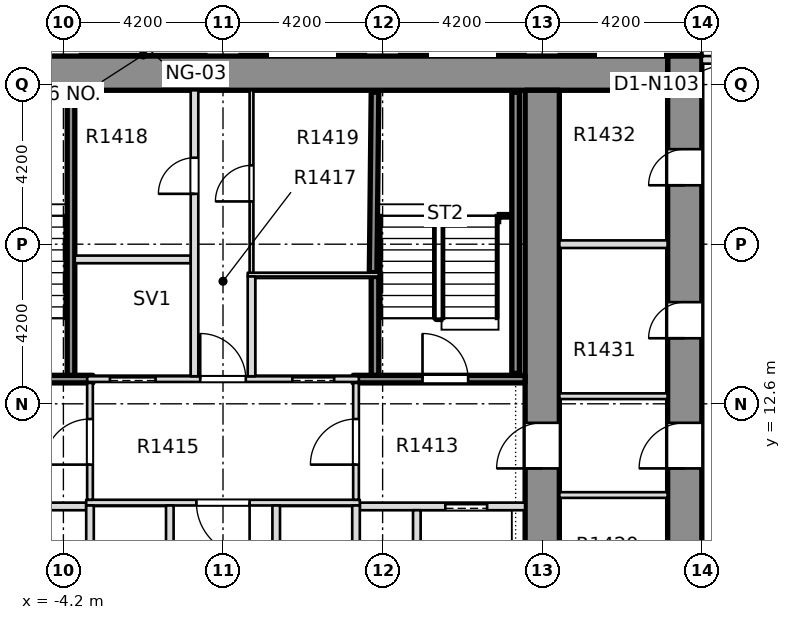
"""IFC4 building model, lengths in metres.
Left out: names, types, materials, properties, quantities, classifications, styles, units other than length and angle.
Written with IfcOpenShell. Run it as: python <this file> out.ifc"""

import sys

from ifc_helpers import new_model, si_unit, direction, frame, frame_2d, origin, place, context, subcontext, project, spatial, rectangle, extrude, element, fill, save


model = new_model("IFC4")
c1 = context("Model", 3, precision=1e-05, world=origin(), true_north=direction((0.0, 1.0)))
c2 = subcontext(c1, "Body", "Model", "MODEL_VIEW")
j1 = project(units=[si_unit("LENGTHUNIT", "METRE"), si_unit("PLANEANGLEUNIT", "RADIAN")], contexts=[c1])
p1 = place(None, origin())
s1 = spatial("IfcSite", under=j1, at=p1, CompositionType="ELEMENT")
p2 = place(p1, origin())
s2 = spatial("IfcBuilding", under=s1, at=p2, CompositionType="ELEMENT")
p3 = place(p2, frame((0.0, 0.0, 62.1)))
s3 = spatial("IfcBuildingStorey", under=s2, at=p3, CompositionType="ELEMENT", Elevation=62.1)
p4 = place(p3, frame((12.15, -8.4, -0.32), z_axis=(0.0, 0.0, 1.0), x_axis=(0.0, 1.0, 0.0)))
e1 = element("IfcWall", 1, at=p4, inside=s3, PredefinedType="SHEAR", context=c2, shape_type="SweptSolid", body=[
    extrude(rectangle(XDim=30.15, YDim=0.9, at=frame_2d((15.075, 0.0))), origin(), (0.0, 0.0, 1.0), 3.45),
])
p5 = place(p4, frame((3.425, 0.0, 0.32)))
e2 = element("IfcOpeningElement", 2, at=p5, cuts=e1, PredefinedType="OPENING", context=c2, shape_type="SweptSolid", body=[
    extrude(rectangle(XDim=0.95, YDim=2.1, at=frame_2d((0.475, 1.05))), frame((0.0, 0.46, 0.0), z_axis=(0.0, -1.0, 0.0), x_axis=(1.0, 0.0, 0.0)), (0.0, 0.0, 1.0), 0.92),
])
p6 = place(p4, frame((8.075, 0.0, 0.32)))
e3 = element("IfcOpeningElement", 3, at=p6, cuts=e1, PredefinedType="OPENING", context=c2, shape_type="SweptSolid", body=[
    extrude(rectangle(XDim=0.95, YDim=2.1, at=frame_2d((0.475, 1.05))), frame((0.0, 0.46, 0.0), z_axis=(0.0, -1.0, 0.0), x_axis=(1.0, 0.0, 0.0)), (0.0, 0.0, 1.0), 0.92),
])
p7 = place(p4, frame((11.425, 0.0, 0.32)))
e4 = element("IfcOpeningElement", 4, at=p7, cuts=e1, PredefinedType="OPENING", context=c2, shape_type="SweptSolid", body=[
    extrude(rectangle(XDim=0.95, YDim=2.1, at=frame_2d((0.475, 1.05))), frame((0.0, 0.46, 0.0), z_axis=(0.0, -1.0, 0.0), x_axis=(1.0, 0.0, 0.0)), (0.0, 0.0, 1.0), 0.92),
])
p8 = place(p4, frame((15.625, 0.0, 0.32)))
e5 = element("IfcOpeningElement", 5, at=p8, cuts=e1, PredefinedType="OPENING", context=c2, shape_type="SweptSolid", body=[
    extrude(rectangle(XDim=0.95, YDim=2.1, at=frame_2d((0.475, 1.05))), frame((0.0, 0.46, 0.0), z_axis=(0.0, -1.0, 0.0), x_axis=(1.0, 0.0, 0.0)), (0.0, 0.0, 1.0), 0.92),
])
p9 = place(p4, frame((22.725, 0.0, 0.32)))
e6 = element("IfcOpeningElement", 6, at=p9, cuts=e1, PredefinedType="OPENING", context=c2, shape_type="SweptSolid", body=[
    extrude(rectangle(XDim=0.95, YDim=2.1, at=frame_2d((0.475, 1.05))), frame((0.0, 0.46, 0.0), z_axis=(0.0, -1.0, 0.0), x_axis=(1.0, 0.0, 0.0)), (0.0, 0.0, 1.0), 0.92),
])
p10 = place(p4, frame((26.75, 0.0, 0.32)))
e7 = element("IfcOpeningElement", 7, at=p10, cuts=e1, PredefinedType="OPENING", context=c2, shape_type="SweptSolid", body=[
    extrude(rectangle(XDim=0.95, YDim=2.1, at=frame_2d((0.475, 1.05))), frame((0.0, 0.46, 0.0), z_axis=(0.0, -1.0, 0.0), x_axis=(1.0, 0.0, 0.0)), (0.0, 0.0, 1.0), 0.92),
])
p11 = place(p4, frame((19.3, 0.0, 0.32)))
e8 = element("IfcOpeningElement", 8, at=p11, cuts=e1, PredefinedType="OPENING", context=c2, shape_type="SweptSolid", body=[
    extrude(rectangle(XDim=1.2, YDim=2.1, at=frame_2d((0.6, 1.05))), frame((0.0, 0.46, 0.0), z_axis=(0.0, -1.0, 0.0), x_axis=(1.0, 0.0, 0.0)), (0.0, 0.0, 1.0), 0.92),
])
p12 = place(p3, frame((-11.7, 21.3, -0.32), z_axis=(0.0, 0.0, 1.0), x_axis=(1.0, 0.0, 0.0)))
e9 = element("IfcWall", 9, at=p12, inside=s3, PredefinedType="SOLIDWALL", context=c2, shape_type="SweptSolid", body=[
    extrude(rectangle(XDim=23.4, YDim=0.9, at=frame_2d((11.7, 0.0))), origin(), (0.0, 0.0, 1.0), 3.45),
])
p13 = place(p3, frame((8.4, -7.5, -0.32), z_axis=(0.0, 0.0, 1.0), x_axis=(0.0, 1.0, 0.0)))
e10 = element("IfcWall", 10, at=p13, inside=s3, PredefinedType="SHEAR", context=c2, shape_type="SweptSolid", body=[
    extrude(rectangle(XDim=28.35, YDim=0.9, at=frame_2d((14.175, 0.0))), origin(), (0.0, 0.0, 1.0), 3.45),
])
p14 = place(p13, frame((18.4, 0.0, 0.32)))
e11 = element("IfcOpeningElement", 11, at=p14, cuts=e10, PredefinedType="OPENING", context=c2, shape_type="SweptSolid", body=[
    extrude(rectangle(XDim=1.2, YDim=2.1, at=frame_2d((0.6, 1.05))), frame((0.0, 0.46, 0.0), z_axis=(0.0, -1.0, 0.0), x_axis=(1.0, 0.0, 0.0)), (0.0, 0.0, 1.0), 0.92),
])
p15 = place(p3, frame((16.1, 21.65, 0.0), z_axis=(0.0, 0.0, 1.0), x_axis=(-1.0, 0.0, 0.0)))
e12 = element("IfcWall", 12, at=p15, inside=s3, PredefinedType="STANDARD", context=c2, shape_type="SweptSolid", body=[
    extrude(rectangle(XDim=3.5, YDim=0.2, at=frame_2d((1.75, 0.0))), origin(), (0.0, 0.0, 1.0), 3.13),
])
p16 = place(p15, frame((2.2, 0.0, 0.0)))
e13 = element("IfcOpeningElement", 13, at=p16, cuts=e12, PredefinedType="OPENING", context=c2, shape_type="SweptSolid", body=[
    extrude(rectangle(XDim=1.0, YDim=2.4, at=frame_2d((0.5, 1.2))), frame((0.0, 0.11, 0.0), z_axis=(0.0, -1.0, 0.0), x_axis=(1.0, 0.0, 0.0)), (0.0, 0.0, 1.0), 0.22),
])
p17 = place(p3, frame((-7.949, 9.9, 0.0), z_axis=(0.0, 0.0, 1.0), x_axis=(1.0, 0.0, 0.0)))
e14 = element("IfcWall", 14, at=p17, inside=s3, PredefinedType="PARTITIONING", context=c2, shape_type="SweptSolid", body=[
    extrude(rectangle(XDim=4.349, YDim=0.2, at=frame_2d((2.174, 0.0))), origin(), (0.0, 0.0, 1.0), 3.13),
])
p18 = place(p17, frame((0.999, 0.0, 0.0)))
e15 = element("IfcOpeningElement", 15, at=p18, cuts=e14, PredefinedType="OPENING", context=c2, shape_type="SweptSolid", body=[
    extrude(rectangle(XDim=1.1, YDim=2.1, at=frame_2d((0.55, 1.05))), frame((0.0, 0.11, 0.0), z_axis=(0.0, -1.0, 0.0), x_axis=(1.0, 0.0, 0.0)), (0.0, 0.0, 1.0), 0.22),
])
p19 = place(p3, frame((3.6, 9.9, 0.0), z_axis=(0.0, 0.0, 1.0), x_axis=(1.0, 0.0, 0.0)))
e16 = element("IfcWall", 16, at=p19, inside=s3, PredefinedType="PARTITIONING", context=c2, shape_type="SweptSolid", body=[
    extrude(rectangle(XDim=4.349, YDim=0.2, at=frame_2d((2.174, 0.0))), origin(), (0.0, 0.0, 1.0), 3.13),
])
p20 = place(p19, frame((2.25, 0.0, 0.0)))
e17 = element("IfcOpeningElement", 17, at=p20, cuts=e16, PredefinedType="OPENING", context=c2, shape_type="SweptSolid", body=[
    extrude(rectangle(XDim=1.1, YDim=2.1, at=frame_2d((0.55, 1.05))), frame((0.0, 0.11, 0.0), z_axis=(0.0, -1.0, 0.0), x_axis=(1.0, 0.0, 0.0)), (0.0, 0.0, 1.0), 0.22),
])
p21 = place(p3, frame((-3.6, 10.0, 0.0), z_axis=(0.0, 0.0, 1.0), x_axis=(1.0, 0.0, 0.0)))
e18 = element("IfcWall", 18, at=p21, inside=s3, PredefinedType="PARTITIONING", context=c2, shape_type="SweptSolid", body=[
    extrude(rectangle(XDim=7.2, YDim=0.15, at=frame_2d((3.6, 0.0))), origin(), (0.0, 0.0, 1.0), 3.13),
])
p22 = place(p21, frame((2.9, 0.0, 0.0)))
e19 = element("IfcOpeningElement", 19, at=p22, cuts=e18, PredefinedType="OPENING", context=c2, shape_type="SweptSolid", body=[
    extrude(rectangle(XDim=1.4, YDim=2.1, at=frame_2d((0.7, 1.05))), frame((0.0, 0.085, 0.0), z_axis=(0.0, -1.0, 0.0), x_axis=(1.0, 0.0, 0.0)), (0.0, 0.0, 1.0), 0.17),
])
p23 = place(p3, frame((-7.949, 13.25, 0.0), z_axis=(0.0, 0.0, 1.0), x_axis=(1.0, 0.0, 0.0)))
e20 = element("IfcWall", 20, at=p23, inside=s3, PredefinedType="SOLIDWALL", context=c2, shape_type="SweptSolid", body=[
    extrude(rectangle(XDim=4.524, YDim=0.2, at=frame_2d((2.262, 0.0))), origin(), (0.0, 0.0, 1.0), 3.13),
])
p24 = place(p23, frame((1.499, 0.0, 0.0)))
e21 = element("IfcOpeningElement", 21, at=p24, cuts=e20, PredefinedType="OPENING", context=c2, shape_type="SweptSolid", body=[
    extrude(rectangle(XDim=1.2, YDim=2.1, at=frame_2d((0.6, 1.05))), frame((0.0, 0.11, 0.0), z_axis=(0.0, -1.0, 0.0), x_axis=(1.0, 0.0, 0.0)), (0.0, 0.0, 1.0), 0.22),
])
p25 = place(p3, frame((-3.575, 13.25, 0.0), z_axis=(0.0, 0.0, 1.0), x_axis=(1.0, 0.0, 0.0)))
e22 = element("IfcWall", 22, at=p25, inside=s3, PredefinedType="PARTITIONING", context=c2, shape_type="SweptSolid", body=[
    extrude(rectangle(XDim=7.15, YDim=0.15, at=frame_2d((3.575, 0.0))), origin(), (0.0, 0.0, 1.0), 3.13),
])
p26 = place(p25, frame((0.6, 0.0, 0.0)))
e23 = element("IfcOpeningElement", 23, at=p26, cuts=e22, PredefinedType="OPENING", context=c2, shape_type="SweptSolid", body=[
    extrude(rectangle(XDim=1.2, YDim=2.1, at=frame_2d((0.6, 1.05))), frame((0.0, 0.085, 0.0), z_axis=(0.0, -1.0, 0.0), x_axis=(1.0, 0.0, 0.0)), (0.0, 0.0, 1.0), 0.17),
])
p27 = place(p25, frame((5.4, 0.0, 0.0)))
e24 = element("IfcOpeningElement", 24, at=p27, cuts=e22, PredefinedType="OPENING", context=c2, shape_type="SweptSolid", body=[
    extrude(rectangle(XDim=1.1, YDim=2.1, at=frame_2d((0.55, 1.05))), frame((0.0, 0.085, 0.0), z_axis=(0.0, -1.0, 0.0), x_axis=(1.0, 0.0, 0.0)), (0.0, 0.0, 1.0), 0.17),
])
p28 = place(p25, frame((2.975, 0.0, 0.0)))
e25 = element("IfcOpeningElement", 25, at=p28, cuts=e22, PredefinedType="OPENING", context=c2, shape_type="SweptSolid", body=[
    extrude(rectangle(XDim=1.2, YDim=2.1, at=frame_2d((0.6, 1.05))), frame((0.0, 0.085, 0.0), z_axis=(0.0, -1.0, 0.0), x_axis=(1.0, 0.0, 0.0)), (0.0, 0.0, 1.0), 0.17),
])
p29 = place(p3, frame((3.425, 13.25, 0.0), z_axis=(0.0, 0.0, 1.0), x_axis=(1.0, 0.0, 0.0)))
e26 = element("IfcWall", 26, at=p29, inside=s3, PredefinedType="SOLIDWALL", context=c2, shape_type="SweptSolid", body=[
    extrude(rectangle(XDim=4.524, YDim=0.2, at=frame_2d((2.262, 0.0))), origin(), (0.0, 0.0, 1.0), 3.13),
])
p30 = place(p29, frame((1.825, 0.0, 0.0)))
e27 = element("IfcOpeningElement", 27, at=p30, cuts=e26, PredefinedType="OPENING", context=c2, shape_type="SweptSolid", body=[
    extrude(rectangle(XDim=1.2, YDim=2.1, at=frame_2d((0.6, 1.05))), frame((0.0, 0.11, 0.0), z_axis=(0.0, -1.0, 0.0), x_axis=(1.0, 0.0, 0.0)), (0.0, 0.0, 1.0), 0.22),
])
p31 = place(p3, frame((0.65, 16.0, 0.0), z_axis=(0.0, 0.0, 1.0), x_axis=(1.0, 0.0, 0.0)))
e28 = element("IfcWall", 28, at=p31, inside=s3, PredefinedType="PARTITIONING", context=c2, shape_type="SweptSolid", body=[
    extrude(rectangle(XDim=3.45, YDim=0.1, at=frame_2d((1.725, 0.0))), origin(), (0.0, 0.0, 1.0), 3.13),
])
p32 = place(p3, frame((-3.9, 16.4, 0.0), z_axis=(0.0, 0.0, 1.0), x_axis=(1.0, 0.0, 0.0)))
e29 = element("IfcWall", 29, at=p32, inside=s3, PredefinedType="PARTITIONING", context=c2, shape_type="SweptSolid", body=[
    extrude(rectangle(XDim=3.05, YDim=0.2, at=frame_2d((1.525, 0.0))), origin(), (0.0, 0.0, 1.0), 3.13),
])
p33 = place(p3, frame((-4.0, 13.35, 0.0), z_axis=(0.0, 0.0, 1.0), x_axis=(0.0, 1.0, 0.0)))
e30 = element("IfcWall", 30, at=p33, inside=s3, PredefinedType="SOLIDWALL", context=c2, shape_type="SweptSolid", body=[
    extrude(rectangle(XDim=7.499, YDim=0.2, at=frame_2d((3.75, 0.0))), origin(), (0.0, 0.0, 1.0), 3.13),
])
p34 = place(p3, frame((-3.5, 7.075, 0.0), z_axis=(0.0, 0.0, 1.0), x_axis=(0.0, 1.0, 0.0)))
e31 = element("IfcWall", 31, at=p34, inside=s3, PredefinedType="PARTITIONING", context=c2, shape_type="SweptSolid", body=[
    extrude(rectangle(XDim=2.85, YDim=0.2, at=frame_2d((1.425, 0.0))), origin(), (0.0, 0.0, 1.0), 3.13),
])
p35 = place(p3, frame((-3.5, 10.075, 0.0), z_axis=(0.0, 0.0, 1.0), x_axis=(0.0, 1.0, 0.0)))
e32 = element("IfcWall", 32, at=p35, inside=s3, PredefinedType="PARTITIONING", context=c2, shape_type="SweptSolid", body=[
    extrude(rectangle(XDim=3.075, YDim=0.15, at=frame_2d((1.538, 0.0))), origin(), (0.0, 0.0, 1.0), 3.13),
])
p36 = place(p35, frame((0.925, 0.0, 0.0)))
e33 = element("IfcOpeningElement", 33, at=p36, cuts=e32, PredefinedType="OPENING", context=c2, shape_type="SweptSolid", body=[
    extrude(rectangle(XDim=1.2, YDim=2.1, at=frame_2d((0.6, 1.05))), frame((0.0, 0.085, 0.0), z_axis=(0.0, -1.0, 0.0), x_axis=(1.0, 0.0, 0.0)), (0.0, 0.0, 1.0), 0.17),
])
p37 = place(p3, frame((-1.4, 7.075, 0.0), z_axis=(0.0, 0.0, 1.0), x_axis=(0.0, 1.0, 0.0)))
e34 = element("IfcWall", 34, at=p37, inside=s3, PredefinedType="PARTITIONING", context=c2, shape_type="SweptSolid", body=[
    extrude(rectangle(XDim=2.85, YDim=0.2, at=frame_2d((1.425, 0.0))), origin(), (0.0, 0.0, 1.0), 3.13),
])
p38 = place(p3, frame((-0.75, 13.325, 0.0), z_axis=(0.0, 0.0, 1.0), x_axis=(0.0, 1.0, 0.0)))
e35 = element("IfcWall", 35, at=p38, inside=s3, PredefinedType="PARTITIONING", context=c2, shape_type="SweptSolid", body=[
    extrude(rectangle(XDim=7.524, YDim=0.2, at=frame_2d((3.762, 0.0))), origin(), (0.0, 0.0, 1.0), 3.13),
])
p39 = place(p38, frame((4.8, 0.0, 0.0)))
e36 = element("IfcOpeningElement", 36, at=p39, cuts=e35, PredefinedType="OPENING", context=c2, shape_type="SweptSolid", body=[
    extrude(rectangle(XDim=0.95, YDim=2.1, at=frame_2d((0.475, 1.05))), frame((0.0, 0.11, 0.0), z_axis=(0.0, -1.0, 0.0), x_axis=(1.0, 0.0, 0.0)), (0.0, 0.0, 1.0), 0.22),
])
p40 = place(p3, frame((0.75, 13.325, 0.0), z_axis=(0.0, 0.0, 1.0), x_axis=(0.0, 1.0, 0.0)))
e37 = element("IfcWall", 37, at=p40, inside=s3, PredefinedType="PARTITIONING", context=c2, shape_type="SweptSolid", body=[
    extrude(rectangle(XDim=2.625, YDim=0.2, at=frame_2d((1.312, 0.0))), origin(), (0.0, 0.0, 1.0), 3.13),
])
p41 = place(p3, frame((0.75, 16.05, 0.0), z_axis=(0.0, 0.0, 1.0), x_axis=(0.0, 1.0, 0.0)))
e38 = element("IfcWall", 38, at=p41, inside=s3, PredefinedType="PARTITIONING", context=c2, shape_type="SweptSolid", body=[
    extrude(rectangle(XDim=4.799, YDim=0.1, at=frame_2d((2.399, 0.0))), origin(), (0.0, 0.0, 1.0), 3.13),
])
p42 = place(p41, frame((1.875, 0.0, 0.0)))
e39 = element("IfcOpeningElement", 39, at=p42, cuts=e38, PredefinedType="OPENING", context=c2, shape_type="SweptSolid", body=[
    extrude(rectangle(XDim=0.95, YDim=2.1, at=frame_2d((0.475, 1.05))), frame((0.0, 0.06, 0.0), z_axis=(0.0, -1.0, 0.0), x_axis=(1.0, 0.0, 0.0)), (0.0, 0.0, 1.0), 0.12),
])
for number, where, z_axis, x_axis in (
    (40, (1.4, 7.075, 0.0), (0.0, 0.0, 1.0), (0.0, 1.0, 0.0)),
    (41, (3.5, 7.075, 0.0), (0.0, 0.0, 1.0), (0.0, 1.0, 0.0)),
):
    element("IfcWall", number, at=place(p3, frame(where, z_axis=z_axis, x_axis=x_axis)), inside=s3, PredefinedType="PARTITIONING", context=c2, shape_type="SweptSolid", body=[
        extrude(rectangle(XDim=2.85, YDim=0.2, at=frame_2d((1.425, 0.0))), origin(), (0.0, 0.0, 1.0), 3.13),
    ])
p43 = place(p3, frame((3.5, 10.075, 0.0), z_axis=(0.0, 0.0, 1.0), x_axis=(0.0, 1.0, 0.0)))
e42 = element("IfcWall", 42, at=p43, inside=s3, PredefinedType="PARTITIONING", context=c2, shape_type="SweptSolid", body=[
    extrude(rectangle(XDim=3.075, YDim=0.15, at=frame_2d((1.538, 0.0))), origin(), (0.0, 0.0, 1.0), 3.13),
])
p44 = place(p43, frame((0.925, 0.0, 0.0)))
e43 = element("IfcOpeningElement", 43, at=p44, cuts=e42, PredefinedType="OPENING", context=c2, shape_type="SweptSolid", body=[
    extrude(rectangle(XDim=1.2, YDim=2.1, at=frame_2d((0.6, 1.05))), frame((0.0, 0.085, 0.0), z_axis=(0.0, -1.0, 0.0), x_axis=(1.0, 0.0, 0.0)), (0.0, 0.0, 1.0), 0.17),
])
p45 = place(p3, frame((4.0, 13.35, 0.0), z_axis=(0.0, 0.0, 1.0), x_axis=(0.0, 1.0, 0.0)))
e44 = element("IfcWall", 44, at=p45, inside=s3, PredefinedType="SOLIDWALL", context=c2, shape_type="SweptSolid", body=[
    extrude(rectangle(XDim=2.6, YDim=0.2, at=frame_2d((1.3, 0.0))), origin(), (0.0, 0.0, 1.0), 3.13),
])
p46 = place(p3, frame((3.95, 16.05, 0.0), z_axis=(0.0, 0.0, 1.0), x_axis=(0.010538176883, 0.999944471872, 0.0)))
e45 = element("IfcWall", 45, at=p46, inside=s3, PredefinedType="SOLIDWALL", context=c2, shape_type="SweptSolid", body=[
    extrude(rectangle(XDim=4.749, YDim=0.2, at=frame_2d((2.375, 0.0))), origin(), (0.0, 0.0, 1.0), 3.13),
])
p47 = place(p3, frame((5.1, 7.075, 0.0), z_axis=(0.0, 0.0, 1.0), x_axis=(0.0, 1.0, 0.0)))
e46 = element("IfcWall", 46, at=p47, inside=s3, PredefinedType="PARTITIONING", context=c2, shape_type="SweptSolid", body=[
    extrude(rectangle(XDim=2.725, YDim=0.2, at=frame_2d((1.363, 0.0))), origin(), (0.0, 0.0, 1.0), 3.13),
])
for number, where, z_axis, x_axis in (
    (47, (8.851, 10.2, 0.0), (0.0, 0.0, 1.0), (1.0, 0.0, 0.0)),
    (48, (8.851, 12.8, 0.0), (0.0, 0.0, 1.0), (1.0, 0.0, 0.0)),
):
    element("IfcWall", number, at=place(p3, frame(where, z_axis=z_axis, x_axis=x_axis)), inside=s3, PredefinedType="PARTITIONING", context=c2, shape_type="SweptSolid", body=[
        extrude(rectangle(XDim=2.848, YDim=0.15, at=frame_2d((1.424, 0.0))), origin(), (0.0, 0.0, 1.0), 3.13),
    ])
p48 = place(p3, frame((8.851, 16.8, 0.0), z_axis=(0.0, 0.0, 1.0), x_axis=(1.0, 0.0, 0.0)))
e49 = element("IfcWall", 49, at=p48, inside=s3, PredefinedType="PARTITIONING", context=c2, shape_type="SweptSolid", body=[
    extrude(rectangle(XDim=2.848, YDim=0.2, at=frame_2d((1.424, 0.0))), origin(), (0.0, 0.0, 1.0), 3.13),
])
p49 = place(p3, frame((7.7, 13.4, 0.0), z_axis=(0.0, 0.0, 1.0), x_axis=(0.0, 1.0, 0.0)))
e50 = element("IfcWall", 50, at=p49, inside=s3, PredefinedType="SOLIDWALL", context=c2, shape_type="SweptSolid", body=[
    extrude(rectangle(XDim=7.4, YDim=0.2, at=frame_2d((3.7, 0.0))), origin(), (0.0, 0.0, 1.0), 3.13),
])
p50 = place(p30, origin())
e51 = element("IfcDoor", 51, at=p50, inside=s3, OperationType="SINGLE_SWING_RIGHT", PredefinedType="DOOR", context=c2, shape_type="SweptSolid", body=[
    extrude(rectangle(XDim=1.2, YDim=2.1, at=frame_2d((0.6, 1.05))), frame((0.0, 0.025, 0.0), z_axis=(0.0, -1.0, 0.0), x_axis=(1.0, 0.0, 0.0)), (0.0, 0.0, 1.0), 0.05),
])
fill(e27, e51)
p51 = place(p20, origin())
e52 = element("IfcDoor", 52, at=p51, inside=s3, OperationType="SLIDING_TO_LEFT", PredefinedType="DOOR", context=c2, shape_type="SweptSolid", body=[
    extrude(rectangle(XDim=1.1, YDim=2.1, at=frame_2d((0.55, 1.05))), frame((0.0, 0.025, 0.0), z_axis=(0.0, -1.0, 0.0), x_axis=(1.0, 0.0, 0.0)), (0.0, 0.0, 1.0), 0.05),
])
fill(e17, e52)
p52 = place(p22, origin())
e53 = element("IfcDoor", 53, at=p52, inside=s3, OperationType="SINGLE_SWING_RIGHT", PredefinedType="DOOR", context=c2, shape_type="SweptSolid", body=[
    extrude(rectangle(XDim=1.4, YDim=2.1, at=frame_2d((0.7, 1.05))), frame((0.0, 0.025, 0.0), z_axis=(0.0, -1.0, 0.0), x_axis=(1.0, 0.0, 0.0)), (0.0, 0.0, 1.0), 0.05),
])
fill(e19, e53)
p53 = place(p26, origin())
e54 = element("IfcDoor", 54, at=p53, inside=s3, OperationType="SLIDING_TO_RIGHT", PredefinedType="DOOR", context=c2, shape_type="SweptSolid", body=[
    extrude(rectangle(XDim=1.2, YDim=2.1, at=frame_2d((0.6, 1.05))), frame((0.0, 0.025, 0.0), z_axis=(0.0, -1.0, 0.0), x_axis=(1.0, 0.0, 0.0)), (0.0, 0.0, 1.0), 0.05),
])
fill(e23, e54)
p54 = place(p27, origin())
e55 = element("IfcDoor", 55, at=p54, inside=s3, OperationType="SLIDING_TO_LEFT", PredefinedType="DOOR", context=c2, shape_type="SweptSolid", body=[
    extrude(rectangle(XDim=1.1, YDim=2.1, at=frame_2d((0.55, 1.05))), frame((0.0, 0.025, 0.0), z_axis=(0.0, -1.0, 0.0), x_axis=(1.0, 0.0, 0.0)), (0.0, 0.0, 1.0), 0.05),
])
fill(e24, e55)
p55 = place(p28, origin())
e56 = element("IfcDoor", 56, at=p55, inside=s3, OperationType="SINGLE_SWING_RIGHT", PredefinedType="DOOR", context=c2, shape_type="SweptSolid", body=[
    extrude(rectangle(XDim=1.2, YDim=2.1, at=frame_2d((0.6, 1.05))), frame((0.0, 0.025, 0.0), z_axis=(0.0, -1.0, 0.0), x_axis=(1.0, 0.0, 0.0)), (0.0, 0.0, 1.0), 0.05),
])
fill(e25, e56)
p56 = place(p39, origin())
e57 = element("IfcDoor", 57, at=p56, inside=s3, OperationType="SINGLE_SWING_RIGHT", PredefinedType="DOOR", context=c2, shape_type="SweptSolid", body=[
    extrude(rectangle(XDim=0.95, YDim=2.1, at=frame_2d((0.475, 1.05))), frame((0.0, 0.025, 0.0), z_axis=(0.0, -1.0, 0.0), x_axis=(1.0, 0.0, 0.0)), (0.0, 0.0, 1.0), 0.05),
])
fill(e36, e57)
p57 = place(p42, origin())
e58 = element("IfcDoor", 58, at=p57, inside=s3, OperationType="SINGLE_SWING_LEFT", PredefinedType="DOOR", context=c2, shape_type="SweptSolid", body=[
    extrude(rectangle(XDim=0.95, YDim=2.1, at=frame_2d((0.475, 1.05))), frame((0.0, 0.025, 0.0), z_axis=(0.0, -1.0, 0.0), x_axis=(1.0, 0.0, 0.0)), (0.0, 0.0, 1.0), 0.05),
])
fill(e39, e58)
p58 = place(p36, origin())
e59 = element("IfcDoor", 59, at=p58, inside=s3, OperationType="SINGLE_SWING_RIGHT", PredefinedType="DOOR", context=c2, shape_type="SweptSolid", body=[
    extrude(rectangle(XDim=1.2, YDim=2.1, at=frame_2d((0.6, 1.05))), frame((0.0, 0.025, 0.0), z_axis=(0.0, -1.0, 0.0), x_axis=(1.0, 0.0, 0.0)), (0.0, 0.0, 1.0), 0.05),
])
fill(e33, e59)
p59 = place(p44, origin())
e60 = element("IfcDoor", 60, at=p59, inside=s3, OperationType="SINGLE_SWING_LEFT", PredefinedType="DOOR", context=c2, shape_type="SweptSolid", body=[
    extrude(rectangle(XDim=1.2, YDim=2.1, at=frame_2d((0.6, 1.05))), frame((0.0, 0.025, 0.0), z_axis=(0.0, -1.0, 0.0), x_axis=(1.0, 0.0, 0.0)), (0.0, 0.0, 1.0), 0.05),
])
fill(e43, e60)
p60 = place(p9, origin())
e61 = element("IfcDoor", 61, at=p60, inside=s3, OperationType="SINGLE_SWING_LEFT", PredefinedType="DOOR", context=c2, shape_type="SweptSolid", body=[
    extrude(rectangle(XDim=0.95, YDim=2.1, at=frame_2d((0.475, 1.05))), frame((0.0, 0.025, 0.0), z_axis=(0.0, -1.0, 0.0), x_axis=(1.0, 0.0, 0.0)), (0.0, 0.0, 1.0), 0.05),
])
fill(e6, e61)
p61 = place(p10, origin())
e62 = element("IfcDoor", 62, at=p61, inside=s3, OperationType="SINGLE_SWING_LEFT", PredefinedType="DOOR", context=c2, shape_type="SweptSolid", body=[
    extrude(rectangle(XDim=0.95, YDim=2.1, at=frame_2d((0.475, 1.05))), frame((0.0, 0.025, 0.0), z_axis=(0.0, -1.0, 0.0), x_axis=(1.0, 0.0, 0.0)), (0.0, 0.0, 1.0), 0.05),
])
fill(e7, e62)
p62 = place(p11, origin())
e63 = element("IfcDoor", 63, at=p62, inside=s3, OperationType="SINGLE_SWING_LEFT", PredefinedType="DOOR", context=c2, shape_type="SweptSolid", body=[
    extrude(rectangle(XDim=1.2, YDim=2.1, at=frame_2d((0.6, 1.05))), frame((0.0, 0.025, 0.0), z_axis=(0.0, -1.0, 0.0), x_axis=(1.0, 0.0, 0.0)), (0.0, 0.0, 1.0), 0.05),
])
fill(e8, e63)
p63 = place(p14, origin())
e64 = element("IfcDoor", 64, at=p63, inside=s3, OperationType="SINGLE_SWING_LEFT", PredefinedType="DOOR", context=c2, shape_type="SweptSolid", body=[
    extrude(rectangle(XDim=1.2, YDim=2.1, at=frame_2d((0.6, 1.05))), frame((0.0, 0.025, 0.0), z_axis=(0.0, -1.0, 0.0), x_axis=(1.0, 0.0, 0.0)), (0.0, 0.0, 1.0), 0.05),
])
fill(e11, e64)
save(model, sys.argv[1])
